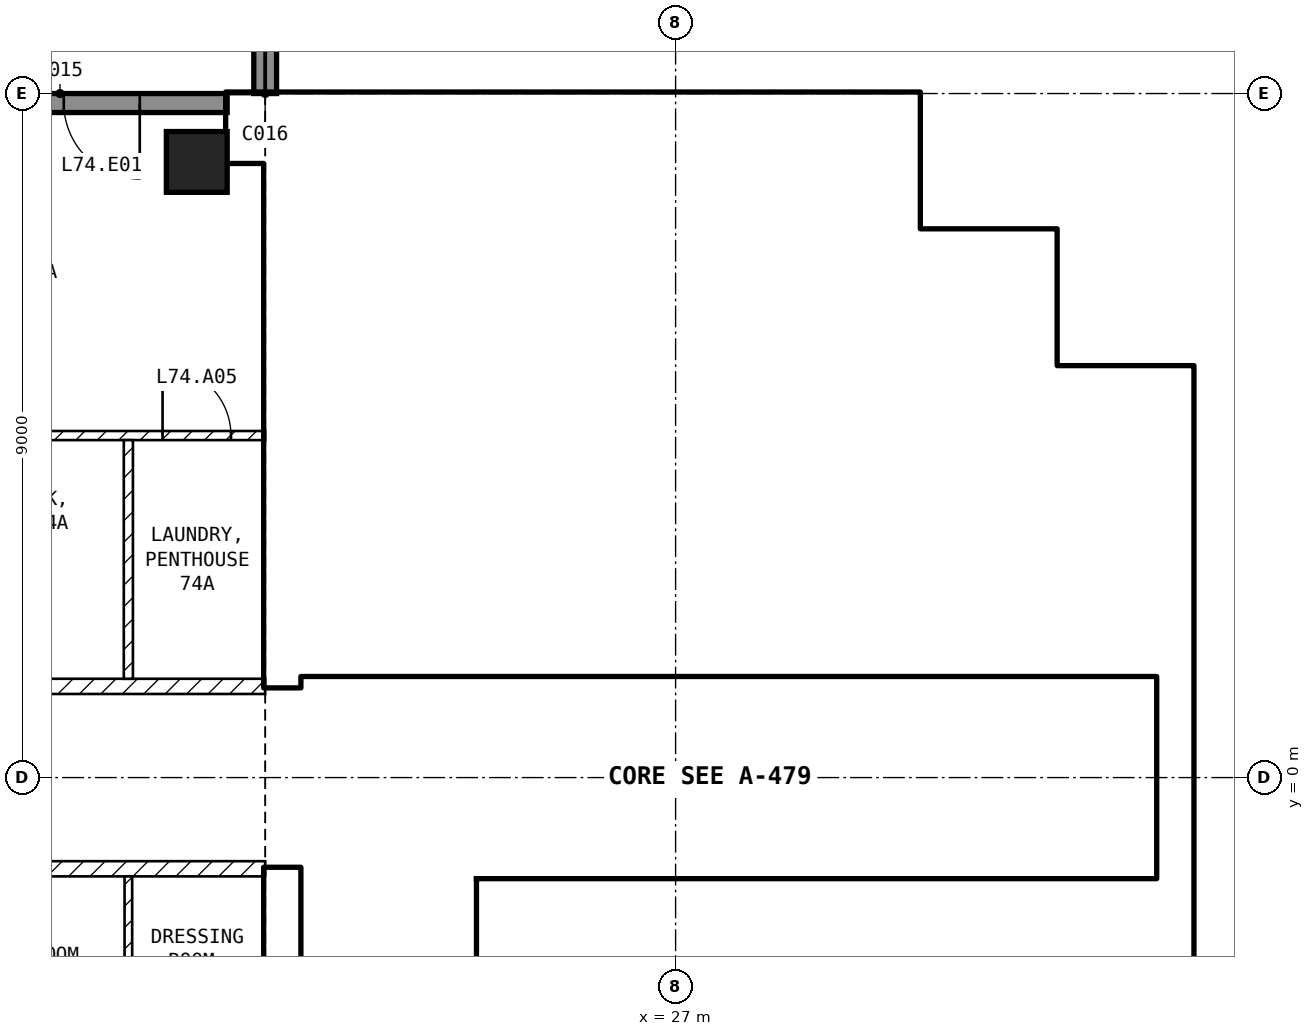
"""IFC4 building model, lengths in metres.
Left out: names, types, materials, properties, quantities, classifications, styles, units other than length and angle.
Written with IfcOpenShell. Run it as: python <this file> out.ifc"""

import sys

from ifc_helpers import new_model, si_unit, direction, frame, frame_2d, origin, origin_2d, place, context, subcontext, project, spatial, rectangle, extrude, element, fill, save


model = new_model("IFC4")
c1 = context("Model", 3, precision=1e-05, world=origin(), true_north=direction((0.0, 1.0)))
c2 = subcontext(c1, "Body", "Model", "MODEL_VIEW")
j1 = project(units=[si_unit("LENGTHUNIT", "METRE"), si_unit("PLANEANGLEUNIT", "RADIAN")], contexts=[c1])
p1 = place(None, origin())
s1 = spatial("IfcSite", under=j1, at=p1, CompositionType="ELEMENT")
p2 = place(p1, origin())
s2 = spatial("IfcBuilding", under=s1, at=p2, CompositionType="ELEMENT")
p3 = place(p2, frame((0.0, 0.0, 290.4)))
s3 = spatial("IfcBuildingStorey", under=s2, at=p3, CompositionType="ELEMENT", Elevation=290.4)
p4 = place(p3, frame((20.7, 8.1, -0.25), z_axis=(0.0, 0.0, 1.0), x_axis=(1.0, 0.0, 0.0)))
e1 = element("IfcColumn", 1, at=p4, inside=s3, PredefinedType="COLUMN", context=c2, shape_type="SweptSolid", body=[
    extrude(rectangle(XDim=0.8, YDim=0.8, at=origin_2d()), origin(), (0.0, 0.0, 1.0), 4.2),
])
p5 = place(p3, frame((21.1, 8.875, 0.0), z_axis=(0.0, 0.0, 1.0), x_axis=(-1.0, 0.0, 0.0)))
e2 = element("IfcWall", 2, at=p5, inside=s3, PredefinedType="SOLIDWALL", context=c2, shape_type="SweptSolid", body=[
    extrude(rectangle(XDim=3.3, YDim=0.25, at=frame_2d((1.65, 0.0))), origin(), (0.0, 0.0, 1.0), 3.95),
])
p6 = place(p5, frame((1.15, 0.0, 0.0)))
e3 = element("IfcOpeningElement", 3, at=p6, cuts=e2, PredefinedType="OPENING", context=c2, shape_type="SweptSolid", body=[
    extrude(rectangle(XDim=1.0, YDim=2.4, at=frame_2d((0.5, 1.2))), frame((0.0, 0.135, 0.0), z_axis=(0.0, -1.0, 0.0), x_axis=(1.0, 0.0, 0.0)), (0.0, 0.0, 1.0), 0.27),
])
p7 = place(p3, frame((21.6, 9.0, 0.0), z_axis=(0.0, 0.0, 1.0), x_axis=(0.0, 1.0, 0.0)))
e4 = element("IfcWall", 4, at=p7, inside=s3, PredefinedType="SOLIDWALL", context=c2, shape_type="SweptSolid", body=[
    extrude(rectangle(XDim=2.7, YDim=0.3, at=frame_2d((1.35, 0.0))), origin(), (0.0, 0.0, 1.0), 3.95),
])
p8 = place(p3, frame((33.575, -4.95, 0.0), z_axis=(0.0, 0.0, 1.0), x_axis=(0.0, 1.0, 0.0)))
e5 = element("IfcWall", 5, at=p8, inside=s3, PredefinedType="SHEAR", context=c2, shape_type="SweptSolid", body=[
    extrude(rectangle(XDim=10.35, YDim=0.45, at=frame_2d((5.175, 0.0))), origin(), (0.0, 0.0, 1.0), 3.95),
])
for number, where, z_axis, x_axis in (
    (6, (31.55, 5.175, 0.0), (0.0, 0.0, 1.0), (1.0, 0.0, 0.0)),
    (7, (31.775, 5.4, 0.0), (0.0, 0.0, 1.0), (0.0, 1.0, 0.0)),
    (8, (29.75, 6.975, 0.0), (0.0, 0.0, 1.0), (1.0, 0.0, 0.0)),
    (9, (29.975, 7.2, 0.0), (0.0, 0.0, 1.0), (0.0, 1.0, 0.0)),
):
    element("IfcWall", number, at=place(p3, frame(where, z_axis=z_axis, x_axis=x_axis)), inside=s3, PredefinedType="SHEAR", context=c2, shape_type="SweptSolid", body=[
        extrude(rectangle(XDim=1.8, YDim=0.45, at=frame_2d((0.9, 0.0))), origin(), (0.0, 0.0, 1.0), 3.95),
    ])
p9 = place(p3, frame((21.1, 8.55, 0.0), z_axis=(0.0, 0.0, 1.0), x_axis=(1.0, 0.0, 0.0)))
e10 = element("IfcWall", 10, at=p9, inside=s3, PredefinedType="SHEAR", context=c2, shape_type="SweptSolid", body=[
    extrude(rectangle(XDim=8.65, YDim=0.9, at=frame_2d((4.325, 0.0))), origin(), (0.0, 0.0, 1.0), 3.95),
])
for number, where, z_axis, x_axis in (
    (11, (21.825, -8.1, 0.0), (0.0, 0.0, 1.0), (0.0, 1.0, 0.0)),
    (12, (21.825, 1.2, 0.0), (0.0, 0.0, 1.0), (0.0, 1.0, 0.0)),
):
    element("IfcWall", number, at=place(p3, frame(where, z_axis=z_axis, x_axis=x_axis)), inside=s3, PredefinedType="SHEAR", context=c2, shape_type="SweptSolid", body=[
        extrude(rectangle(XDim=6.9, YDim=0.45, at=frame_2d((3.45, 0.0))), origin(), (0.0, 0.0, 1.0), 3.95),
    ])
p10 = place(p3, frame((22.05, 1.45, 0.0), z_axis=(0.0, 0.0, 1.0), x_axis=(1.0, 0.0, 0.0)))
e13 = element("IfcWall", 13, at=p10, inside=s3, PredefinedType="SOLIDWALL", context=c2, shape_type="SweptSolid", body=[
    extrude(rectangle(XDim=11.3, YDim=0.2, at=frame_2d((5.65, 0.0))), origin(), (0.0, 0.0, 1.0), 3.95),
])
p11 = place(p10, frame((0.75, 0.0, 0.0)))
e14 = element("IfcOpeningElement", 14, at=p11, cuts=e13, PredefinedType="OPENING", context=c2, shape_type="SweptSolid", body=[
    extrude(rectangle(XDim=1.0, YDim=2.1, at=frame_2d((0.5, 1.05))), frame((0.0, 0.11, 0.0), z_axis=(0.0, -1.0, 0.0), x_axis=(1.0, 0.0, 0.0)), (0.0, 0.0, 1.0), 0.22),
])
p12 = place(p10, frame((3.25, 0.0, 0.0)))
e15 = element("IfcOpeningElement", 15, at=p12, cuts=e13, PredefinedType="OPENING", context=c2, shape_type="SweptSolid", body=[
    extrude(rectangle(XDim=1.0, YDim=2.1, at=frame_2d((0.5, 1.05))), frame((0.0, 0.11, 0.0), z_axis=(0.0, -1.0, 0.0), x_axis=(1.0, 0.0, 0.0)), (0.0, 0.0, 1.0), 0.22),
])
p13 = place(p10, frame((9.225, 0.0, 0.0)))
e16 = element("IfcOpeningElement", 16, at=p13, cuts=e13, PredefinedType="OPENING", context=c2, shape_type="SweptSolid", body=[
    extrude(rectangle(XDim=0.9, YDim=2.1, at=frame_2d((0.45, 1.05))), frame((0.0, 0.11, 0.0), z_axis=(0.0, -1.0, 0.0), x_axis=(1.0, 0.0, 0.0)), (0.0, 0.0, 1.0), 0.22),
])
p14 = place(p3, frame((24.5, -5.05, 0.0), z_axis=(0.0, 0.0, 1.0), x_axis=(0.0, 1.0, 0.0)))
e17 = element("IfcWall", 17, at=p14, inside=s3, PredefinedType="SOLIDWALL", context=c2, shape_type="SweptSolid", body=[
    extrude(rectangle(XDim=3.7, YDim=0.2, at=frame_2d((1.85, 0.0))), origin(), (0.0, 0.0, 1.0), 3.95),
])
p15 = place(p14, frame((0.1, 0.0, 0.0)))
e18 = element("IfcOpeningElement", 18, at=p15, cuts=e17, PredefinedType="OPENING", context=c2, shape_type="SweptSolid", body=[
    extrude(rectangle(XDim=0.8, YDim=2.1, at=frame_2d((0.4, 1.05))), frame((0.0, 0.11, 0.0), z_axis=(0.0, -1.0, 0.0), x_axis=(1.0, 0.0, 0.0)), (0.0, 0.0, 1.0), 0.22),
])
p16 = place(p3, frame((22.05, 5.15, 0.0), z_axis=(0.0, 0.0, 1.0), x_axis=(1.0, 0.0, 0.0)))
e19 = element("IfcWall", 19, at=p16, inside=s3, PredefinedType="SOLIDWALL", context=c2, shape_type="SweptSolid", body=[
    extrude(rectangle(XDim=6.3, YDim=0.2, at=frame_2d((3.15, 0.0))), origin(), (0.0, 0.0, 1.0), 3.95),
])
p17 = place(p16, frame((0.2, 0.0, 0.0)))
e20 = element("IfcOpeningElement", 20, at=p17, cuts=e19, PredefinedType="OPENING", context=c2, shape_type="SweptSolid", body=[
    extrude(rectangle(XDim=1.0, YDim=2.1, at=frame_2d((0.5, 1.05))), frame((0.0, 0.11, 0.0), z_axis=(0.0, -1.0, 0.0), x_axis=(1.0, 0.0, 0.0)), (0.0, 0.0, 1.0), 0.22),
])
p18 = place(p3, frame((28.25, 5.25, 0.0), z_axis=(0.0, 0.0, 1.0), x_axis=(0.0, 1.0, 0.0)))
e21 = element("IfcWall", 21, at=p18, inside=s3, PredefinedType="SOLIDWALL", context=c2, shape_type="SweptSolid", body=[
    extrude(rectangle(XDim=2.85, YDim=0.2, at=frame_2d((1.425, 0.0))), origin(), (0.0, 0.0, 1.0), 3.95),
])
p19 = place(p3, frame((24.6, -1.45, 0.0), z_axis=(0.0, 0.0, 1.0), x_axis=(1.0, 0.0, 0.0)))
e22 = element("IfcWall", 22, at=p19, inside=s3, PredefinedType="SOLIDWALL", context=c2, shape_type="SweptSolid", body=[
    extrude(rectangle(XDim=8.75, YDim=0.2, at=frame_2d((4.375, 0.0))), origin(), (0.0, 0.0, 1.0), 3.95),
])
p20 = place(p19, frame((0.4, 0.0, 0.0)))
e23 = element("IfcOpeningElement", 23, at=p20, cuts=e22, PredefinedType="OPENING", context=c2, shape_type="SweptSolid", body=[
    extrude(rectangle(XDim=1.0, YDim=2.1, at=frame_2d((0.5, 1.05))), frame((0.0, 0.11, 0.0), z_axis=(0.0, -1.0, 0.0), x_axis=(1.0, 0.0, 0.0)), (0.0, 0.0, 1.0), 0.22),
])
p21 = place(p19, frame((2.4, 0.0, 0.0)))
e24 = element("IfcOpeningElement", 24, at=p21, cuts=e22, PredefinedType="OPENING", context=c2, shape_type="SweptSolid", body=[
    extrude(rectangle(XDim=1.0, YDim=2.1, at=frame_2d((0.5, 1.05))), frame((0.0, 0.11, 0.0), z_axis=(0.0, -1.0, 0.0), x_axis=(1.0, 0.0, 0.0)), (0.0, 0.0, 1.0), 0.22),
])
p22 = place(p19, frame((4.4, 0.0, 0.0)))
e25 = element("IfcOpeningElement", 25, at=p22, cuts=e22, PredefinedType="OPENING", context=c2, shape_type="SweptSolid", body=[
    extrude(rectangle(XDim=1.0, YDim=2.1, at=frame_2d((0.5, 1.05))), frame((0.0, 0.11, 0.0), z_axis=(0.0, -1.0, 0.0), x_axis=(1.0, 0.0, 0.0)), (0.0, 0.0, 1.0), 0.22),
])
p23 = place(p19, frame((6.925, 0.0, 0.0)))
e26 = element("IfcOpeningElement", 26, at=p23, cuts=e22, PredefinedType="OPENING", context=c2, shape_type="SweptSolid", body=[
    extrude(rectangle(XDim=0.9, YDim=2.1, at=frame_2d((0.45, 1.05))), frame((0.0, 0.11, 0.0), z_axis=(0.0, -1.0, 0.0), x_axis=(1.0, 0.0, 0.0)), (0.0, 0.0, 1.0), 0.22),
])
p24 = place(p3, frame((27.2, 3.95, 0.0), z_axis=(0.0, 0.0, 1.0), x_axis=(1.0, 0.0, 0.0)))
e27 = element("IfcWall", 27, at=p24, inside=s3, PredefinedType="SOLIDWALL", context=c2, shape_type="SweptSolid", body=[
    extrude(rectangle(XDim=6.15, YDim=0.2, at=frame_2d((3.075, 0.0))), origin(), (0.0, 0.0, 1.0), 3.95),
])
p25 = place(p3, frame((27.1, 1.55, 0.0), z_axis=(0.0, 0.0, 1.0), x_axis=(0.0, 1.0, 0.0)))
e28 = element("IfcWall", 28, at=p25, inside=s3, PredefinedType="SOLIDWALL", context=c2, shape_type="SweptSolid", body=[
    extrude(rectangle(XDim=3.5, YDim=0.2, at=frame_2d((1.75, 0.0))), origin(), (0.0, 0.0, 1.0), 3.95),
])
p26 = place(p25, frame((0.6, 0.0, 0.0)))
e29 = element("IfcOpeningElement", 29, at=p26, cuts=e28, PredefinedType="OPENING", context=c2, shape_type="SweptSolid", body=[
    extrude(rectangle(XDim=1.1, YDim=2.1, at=frame_2d((0.55, 1.05))), frame((0.0, 0.11, 0.0), z_axis=(0.0, -1.0, 0.0), x_axis=(1.0, 0.0, 0.0)), (0.0, 0.0, 1.0), 0.22),
])
p27 = place(p25, frame((2.6, 0.0, 0.0)))
e30 = element("IfcOpeningElement", 30, at=p27, cuts=e28, PredefinedType="OPENING", context=c2, shape_type="SweptSolid", body=[
    extrude(rectangle(XDim=0.8, YDim=2.1, at=frame_2d((0.4, 1.05))), frame((0.0, 0.11, 0.0), z_axis=(0.0, -1.0, 0.0), x_axis=(1.0, 0.0, 0.0)), (0.0, 0.0, 1.0), 0.22),
])
for number, where, z_axis, x_axis in (
    (31, (30.0, 1.55, 0.0), (0.0, 0.0, 1.0), (0.0, 1.0, 0.0)),
    (32, (26.5, -3.85, 0.0), (0.0, 0.0, 1.0), (0.0, 1.0, 0.0)),
    (33, (28.5, -3.85, 0.0), (0.0, 0.0, 1.0), (0.0, 1.0, 0.0)),
    (34, (30.5, -3.85, 0.0), (0.0, 0.0, 1.0), (0.0, 1.0, 0.0)),
):
    element("IfcWall", number, at=place(p3, frame(where, z_axis=z_axis, x_axis=x_axis)), inside=s3, PredefinedType="SOLIDWALL", context=c2, shape_type="SweptSolid", body=[
        extrude(rectangle(XDim=2.3, YDim=0.2, at=frame_2d((1.15, 0.0))), origin(), (0.0, 0.0, 1.0), 3.95),
    ])
p28 = place(p3, frame((1.1, 1.2, 0.0), z_axis=(0.0, 0.0, 1.0), x_axis=(1.0, 0.0, 0.0)))
e35 = element("IfcWall", 35, at=p28, inside=s3, PredefinedType="PARTITIONING", context=c2, shape_type="SweptSolid", body=[
    extrude(rectangle(XDim=20.5, YDim=0.2, at=frame_2d((10.25, 0.0))), origin(), (0.0, 0.0, 1.0), 3.95),
])
p29 = place(p28, frame((13.4, 0.0, 0.0)))
e36 = element("IfcOpeningElement", 36, at=p29, cuts=e35, PredefinedType="OPENING", context=c2, shape_type="SweptSolid", body=[
    extrude(rectangle(XDim=1.0, YDim=2.1, at=frame_2d((0.5, 1.05))), frame((0.0, 0.11, 0.0), z_axis=(0.0, -1.0, 0.0), x_axis=(1.0, 0.0, 0.0)), (0.0, 0.0, 1.0), 0.22),
])
p30 = place(p3, frame((21.6, -1.2, 0.0), z_axis=(0.0, 0.0, 1.0), x_axis=(-1.0, 0.0, 0.0)))
e37 = element("IfcWall", 37, at=p30, inside=s3, PredefinedType="PARTITIONING", context=c2, shape_type="SweptSolid", body=[
    extrude(rectangle(XDim=20.5, YDim=0.2, at=frame_2d((10.25, 0.0))), origin(), (0.0, 0.0, 1.0), 3.95),
])
p31 = place(p30, frame((10.3, 0.0, 0.0)))
e38 = element("IfcOpeningElement", 38, at=p31, cuts=e37, PredefinedType="OPENING", context=c2, shape_type="SweptSolid", body=[
    extrude(rectangle(XDim=1.0, YDim=2.1, at=frame_2d((0.5, 1.05))), frame((0.0, 0.11, 0.0), z_axis=(0.0, -1.0, 0.0), x_axis=(1.0, 0.0, 0.0)), (0.0, 0.0, 1.0), 0.22),
])
p32 = place(p3, frame((13.8, 4.5, 0.0), z_axis=(0.0, 0.0, 1.0), x_axis=(1.0, 0.0, 0.0)))
e39 = element("IfcWall", 39, at=p32, inside=s3, PredefinedType="PARTITIONING", context=c2, shape_type="SweptSolid", body=[
    extrude(rectangle(XDim=7.8, YDim=0.12, at=frame_2d((3.9, 0.0))), origin(), (0.0, 0.0, 1.0), 3.95),
])
p33 = place(p32, frame((6.45, 0.0, 0.0)))
e40 = element("IfcOpeningElement", 40, at=p33, cuts=e39, PredefinedType="OPENING", context=c2, shape_type="SweptSolid", body=[
    extrude(rectangle(XDim=0.9, YDim=2.1, at=frame_2d((0.45, 1.05))), frame((0.0, 0.07, 0.0), z_axis=(0.0, -1.0, 0.0), x_axis=(1.0, 0.0, 0.0)), (0.0, 0.0, 1.0), 0.14),
])
p34 = place(p32, frame((0.75, 0.0, 0.0)))
e41 = element("IfcOpeningElement", 41, at=p34, cuts=e39, PredefinedType="OPENING", context=c2, shape_type="SweptSolid", body=[
    extrude(rectangle(XDim=0.9, YDim=2.1, at=frame_2d((0.45, 1.05))), frame((0.0, 0.07, 0.0), z_axis=(0.0, -1.0, 0.0), x_axis=(1.0, 0.0, 0.0)), (0.0, 0.0, 1.0), 0.14),
])
p35 = place(p3, frame((19.8, 4.44, 0.0), z_axis=(0.0, 0.0, 1.0), x_axis=(0.0, -1.0, 0.0)))
e42 = element("IfcWall", 42, at=p35, inside=s3, PredefinedType="PARTITIONING", context=c2, shape_type="SweptSolid", body=[
    extrude(rectangle(XDim=3.14, YDim=0.12, at=frame_2d((1.57, 0.0))), origin(), (0.0, 0.0, 1.0), 3.95),
])
p36 = place(p3, frame((19.8, -1.3, 0.0), z_axis=(0.0, 0.0, 1.0), x_axis=(0.0, -1.0, 0.0)))
e43 = element("IfcWall", 43, at=p36, inside=s3, PredefinedType="PARTITIONING", context=c2, shape_type="SweptSolid", body=[
    extrude(rectangle(XDim=2.54, YDim=0.1, at=frame_2d((1.27, 0.0))), origin(), (0.0, 0.0, 1.0), 3.95),
])
p37 = place(p6, origin())
e44 = element("IfcDoor", 44, at=p37, inside=s3, OperationType="SINGLE_SWING_LEFT", PredefinedType="DOOR", context=c2, shape_type="SweptSolid", body=[
    extrude(rectangle(XDim=1.0, YDim=2.4, at=frame_2d((0.5, 1.2))), frame((0.0, 0.025, 0.0), z_axis=(0.0, -1.0, 0.0), x_axis=(1.0, 0.0, 0.0)), (0.0, 0.0, 1.0), 0.05),
])
fill(e3, e44)
p38 = place(p20, origin())
e45 = element("IfcDoor", 45, at=p38, inside=s3, OperationType="DOUBLE_DOOR_SLIDING", PredefinedType="DOOR", context=c2, shape_type="SweptSolid", body=[
    extrude(rectangle(XDim=1.0, YDim=2.1, at=frame_2d((0.5, 1.05))), frame((0.0, 0.025, 0.0), z_axis=(0.0, -1.0, 0.0), x_axis=(1.0, 0.0, 0.0)), (0.0, 0.0, 1.0), 0.05),
])
fill(e23, e45)
p39 = place(p26, origin())
e46 = element("IfcDoor", 46, at=p39, inside=s3, OperationType="DOUBLE_DOOR_SLIDING", PredefinedType="DOOR", context=c2, shape_type="SweptSolid", body=[
    extrude(rectangle(XDim=1.1, YDim=2.1, at=frame_2d((0.55, 1.05))), frame((0.0, 0.025, 0.0), z_axis=(0.0, -1.0, 0.0), x_axis=(1.0, 0.0, 0.0)), (0.0, 0.0, 1.0), 0.05),
])
fill(e29, e46)
p40 = place(p21, origin())
e47 = element("IfcDoor", 47, at=p40, inside=s3, OperationType="DOUBLE_DOOR_SLIDING", PredefinedType="DOOR", context=c2, shape_type="SweptSolid", body=[
    extrude(rectangle(XDim=1.0, YDim=2.1, at=frame_2d((0.5, 1.05))), frame((0.0, 0.025, 0.0), z_axis=(0.0, -1.0, 0.0), x_axis=(1.0, 0.0, 0.0)), (0.0, 0.0, 1.0), 0.05),
])
fill(e24, e47)
p41 = place(p22, origin())
e48 = element("IfcDoor", 48, at=p41, inside=s3, OperationType="DOUBLE_DOOR_SLIDING", PredefinedType="DOOR", context=c2, shape_type="SweptSolid", body=[
    extrude(rectangle(XDim=1.0, YDim=2.1, at=frame_2d((0.5, 1.05))), frame((0.0, 0.025, 0.0), z_axis=(0.0, -1.0, 0.0), x_axis=(1.0, 0.0, 0.0)), (0.0, 0.0, 1.0), 0.05),
])
fill(e25, e48)
p42 = place(p17, origin())
e49 = element("IfcDoor", 49, at=p42, inside=s3, OperationType="SINGLE_SWING_LEFT", PredefinedType="DOOR", context=c2, shape_type="SweptSolid", body=[
    extrude(rectangle(XDim=1.0, YDim=2.1, at=frame_2d((0.5, 1.05))), frame((0.0, 0.025, 0.0), z_axis=(0.0, -1.0, 0.0), x_axis=(1.0, 0.0, 0.0)), (0.0, 0.0, 1.0), 0.05),
])
fill(e20, e49)
p43 = place(p11, origin())
e50 = element("IfcDoor", 50, at=p43, inside=s3, OperationType="SINGLE_SWING_LEFT", PredefinedType="DOOR", context=c2, shape_type="SweptSolid", body=[
    extrude(rectangle(XDim=1.0, YDim=2.1, at=frame_2d((0.5, 1.05))), frame((0.0, 0.025, 0.0), z_axis=(0.0, -1.0, 0.0), x_axis=(1.0, 0.0, 0.0)), (0.0, 0.0, 1.0), 0.05),
])
fill(e14, e50)
p44 = place(p12, origin())
e51 = element("IfcDoor", 51, at=p44, inside=s3, OperationType="SINGLE_SWING_LEFT", PredefinedType="DOOR", context=c2, shape_type="SweptSolid", body=[
    extrude(rectangle(XDim=1.0, YDim=2.1, at=frame_2d((0.5, 1.05))), frame((0.0, 0.025, 0.0), z_axis=(0.0, -1.0, 0.0), x_axis=(1.0, 0.0, 0.0)), (0.0, 0.0, 1.0), 0.05),
])
fill(e15, e51)
p45 = place(p27, origin())
e52 = element("IfcDoor", 52, at=p45, inside=s3, OperationType="SINGLE_SWING_LEFT", PredefinedType="DOOR", context=c2, shape_type="SweptSolid", body=[
    extrude(rectangle(XDim=0.8, YDim=2.1, at=frame_2d((0.4, 1.05))), frame((0.0, 0.025, 0.0), z_axis=(0.0, -1.0, 0.0), x_axis=(1.0, 0.0, 0.0)), (0.0, 0.0, 1.0), 0.05),
])
fill(e30, e52)
p46 = place(p13, origin())
e53 = element("IfcDoor", 53, at=p46, inside=s3, OperationType="SINGLE_SWING_LEFT", PredefinedType="DOOR", context=c2, shape_type="SweptSolid", body=[
    extrude(rectangle(XDim=0.9, YDim=2.1, at=frame_2d((0.45, 1.05))), frame((0.0, 0.025, 0.0), z_axis=(0.0, -1.0, 0.0), x_axis=(1.0, 0.0, 0.0)), (0.0, 0.0, 1.0), 0.05),
])
fill(e16, e53)
p47 = place(p23, origin())
e54 = element("IfcDoor", 54, at=p47, inside=s3, OperationType="SINGLE_SWING_LEFT", PredefinedType="DOOR", context=c2, shape_type="SweptSolid", body=[
    extrude(rectangle(XDim=0.9, YDim=2.1, at=frame_2d((0.45, 1.05))), frame((0.0, 0.025, 0.0), z_axis=(0.0, -1.0, 0.0), x_axis=(1.0, 0.0, 0.0)), (0.0, 0.0, 1.0), 0.05),
])
fill(e26, e54)
p48 = place(p33, origin())
e55 = element("IfcDoor", 55, at=p48, inside=s3, OperationType="SINGLE_SWING_LEFT", PredefinedType="DOOR", context=c2, shape_type="SweptSolid", body=[
    extrude(rectangle(XDim=0.9, YDim=2.1, at=frame_2d((0.45, 1.05))), frame((0.0, 0.025, 0.0), z_axis=(0.0, -1.0, 0.0), x_axis=(1.0, 0.0, 0.0)), (0.0, 0.0, 1.0), 0.05),
])
fill(e40, e55)
save(model, sys.argv[1])
